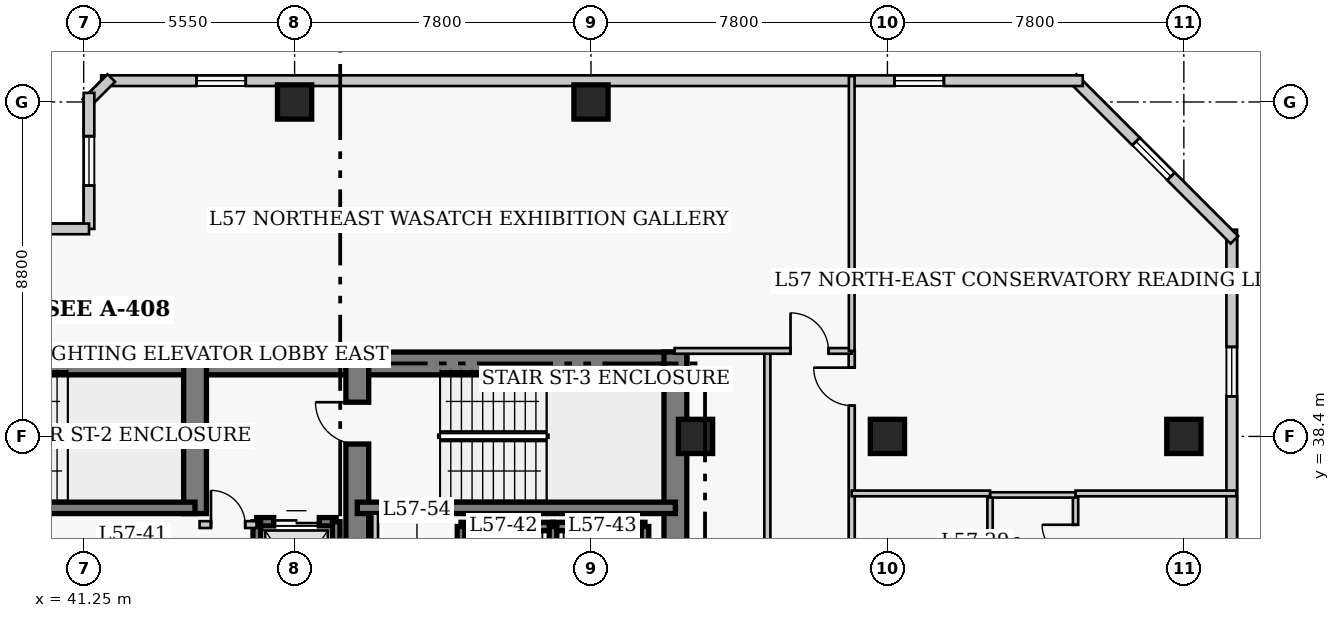
"""IFC4 building model, lengths in metres.
Left out: names, types, materials, properties, quantities, classifications, styles, units other than length and angle.
Written with IfcOpenShell. Run it as: python <this file> out.ifc"""

import sys

from ifc_helpers import new_model, si_unit, direction, frame, frame_2d, origin, origin_2d, place, context, subcontext, project, spatial, rectangle, extrude, element, fill, save


model = new_model("IFC4")
c1 = context("Model", 3, precision=1e-05, world=origin(), true_north=direction((0.0, 1.0)))
c2 = subcontext(c1, "Body", "Model", "MODEL_VIEW")
j1 = project(units=[si_unit("LENGTHUNIT", "METRE"), si_unit("PLANEANGLEUNIT", "RADIAN")], contexts=[c1])
p1 = place(None, origin())
s1 = spatial("IfcSite", under=j1, at=p1, CompositionType="ELEMENT")
p2 = place(p1, origin())
s2 = spatial("IfcBuilding", under=s1, at=p2, CompositionType="ELEMENT")
p3 = place(p2, frame((0.0, 0.0, 228.0)))
s3 = spatial("IfcBuildingStorey", under=s2, at=p3, CompositionType="ELEMENT", Elevation=228.0)
p4 = place(p3, frame((35.85, 40.32, 0.0), z_axis=(0.0, 0.0, 1.0), x_axis=(1.0, 0.0, 0.0)))
e1 = element("IfcWall", 1, at=p4, inside=s3, PredefinedType="SHEAR", context=c2, shape_type="SweptSolid", body=[
    extrude(rectangle(XDim=12.6, YDim=0.6, at=frame_2d((6.3, 0.0))), origin(), (0.0, 0.0, 1.0), 3.9),
])
p5 = place(p3, frame((48.45, 40.32, 0.0), z_axis=(0.0, 0.0, 1.0), x_axis=(1.0, 0.0, 0.0)))
e2 = element("IfcWall", 2, at=p5, inside=s3, PredefinedType="SHEAR", context=c2, shape_type="SweptSolid", body=[
    extrude(rectangle(XDim=8.67, YDim=0.6, at=frame_2d((4.335, 0.0))), origin(), (0.0, 0.0, 1.0), 3.9),
])
p6 = place(p3, frame((56.82, 27.05, 0.0), z_axis=(0.0, 0.0, 1.0), x_axis=(0.0, 1.0, 0.0)))
e3 = element("IfcWall", 3, at=p6, inside=s3, PredefinedType="SHEAR", context=c2, shape_type="SweptSolid", body=[
    extrude(rectangle(XDim=13.57, YDim=0.6, at=frame_2d((6.785, 0.0))), origin(), (0.0, 0.0, 1.0), 3.9),
])
p7 = place(p3, frame((44.18, 36.37, 0.0), z_axis=(0.0, 0.0, 1.0), x_axis=(0.0, 1.0, 0.0)))
e4 = element("IfcWall", 4, at=p7, inside=s3, PredefinedType="SHEAR", context=c2, shape_type="SweptSolid", body=[
    extrude(rectangle(XDim=3.95, YDim=0.6, at=frame_2d((1.975, 0.0))), origin(), (0.0, 0.0, 1.0), 3.9),
])
p8 = place(p3, frame((48.45, 32.45, 0.0), z_axis=(0.0, 0.0, 1.0), x_axis=(0.0, 1.0, 0.0)))
e5 = element("IfcWall", 5, at=p8, inside=s3, PredefinedType="SHEAR", context=c2, shape_type="SweptSolid", body=[
    extrude(rectangle(XDim=7.87, YDim=0.6, at=frame_2d((3.935, 0.0))), origin(), (0.0, 0.0, 1.0), 3.9),
])
p9 = place(p8, frame((5.75, 0.0, 0.0)))
e6 = element("IfcOpeningElement", 6, at=p9, cuts=e5, PredefinedType="OPENING", context=c2, shape_type="SweptSolid", body=[
    extrude(rectangle(XDim=1.1, YDim=2.15, at=frame_2d((0.55, 1.075))), frame((0.0, 0.31, 0.0), z_axis=(0.0, -1.0, 0.0), x_axis=(1.0, 0.0, 0.0)), (0.0, 0.0, 1.0), 0.62),
])
p10 = place(p3, frame((35.85, 36.52, 0.0), z_axis=(0.0, 0.0, 1.0), x_axis=(1.0, 0.0, 0.0)))
e7 = element("IfcWall", 7, at=p10, inside=s3, PredefinedType="SHEAR", context=c2, shape_type="SweptSolid", body=[
    extrude(rectangle(XDim=8.33, YDim=0.3, at=frame_2d((4.165, 0.0))), origin(), (0.0, 0.0, 1.0), 3.9),
])
p11 = place(p3, frame((48.45, 36.52, 0.0), z_axis=(0.0, 0.0, 1.0), x_axis=(1.0, 0.0, 0.0)))
e8 = element("IfcWall", 8, at=p11, inside=s3, PredefinedType="SHEAR", context=c2, shape_type="SweptSolid", body=[
    extrude(rectangle(XDim=8.37, YDim=0.3, at=frame_2d((4.185, 0.0))), origin(), (0.0, 0.0, 1.0), 3.9),
])
for number, where, z_axis, x_axis in (
    (9, (46.8, 47.2, 0.0), (0.0, 0.0, 1.0), (1.0, 0.0, 0.0)),
    (10, (54.6, 47.2, 0.0), (0.0, 0.0, 1.0), (1.0, 0.0, 0.0)),
    (11, (62.4, 38.4, 0.0), (0.0, 0.0, 1.0), (1.0, 0.0, 0.0)),
    (12, (70.2, 38.4, 0.0), (0.0, 0.0, 1.0), (1.0, 0.0, 0.0)),
    (13, (57.35, 38.4, 0.0), (0.0, 0.0, 1.0), (1.0, 0.0, 0.0)),
):
    element("IfcColumn", number, at=place(p3, frame(where, z_axis=z_axis, x_axis=x_axis)), inside=s3, PredefinedType="COLUMN", context=c2, shape_type="SweptSolid", body=[
        extrude(rectangle(XDim=0.9, YDim=0.9, at=origin_2d()), origin(), (0.0, 0.0, 1.0), 3.9),
    ])
p12 = place(p3, frame((71.46, 13.96, 0.0), z_axis=(0.0, 0.0, 1.0), x_axis=(0.0, 1.0, 0.0)))
e14 = element("IfcWall", 14, at=p12, inside=s3, PredefinedType="SOLIDWALL", context=c2, shape_type="SweptSolid", body=[
    extrude(rectangle(XDim=29.88, YDim=0.28, at=frame_2d((14.94, 0.0))), origin(), (0.0, 0.0, 1.0), 3.56),
])
p13 = place(p12, frame((3.085, 0.0, 0.85)))
e15 = element("IfcOpeningElement", 15, at=p13, cuts=e14, PredefinedType="OPENING", context=c2, shape_type="SweptSolid", body=[
    extrude(rectangle(XDim=1.3, YDim=1.7, at=frame_2d((0.65, 0.85))), frame((0.0, 0.15, 0.0), z_axis=(0.0, -1.0, 0.0), x_axis=(1.0, 0.0, 0.0)), (0.0, 0.0, 1.0), 0.3),
])
p14 = place(p12, frame((10.555, 0.0, 0.85)))
e16 = element("IfcOpeningElement", 16, at=p14, cuts=e14, PredefinedType="OPENING", context=c2, shape_type="SweptSolid", body=[
    extrude(rectangle(XDim=1.3, YDim=1.7, at=frame_2d((0.65, 0.85))), frame((0.0, 0.15, 0.0), z_axis=(0.0, -1.0, 0.0), x_axis=(1.0, 0.0, 0.0)), (0.0, 0.0, 1.0), 0.3),
])
p15 = place(p12, frame((18.025, 0.0, 0.85)))
e17 = element("IfcOpeningElement", 17, at=p15, cuts=e14, PredefinedType="OPENING", context=c2, shape_type="SweptSolid", body=[
    extrude(rectangle(XDim=1.3, YDim=1.7, at=frame_2d((0.65, 0.85))), frame((0.0, 0.15, 0.0), z_axis=(0.0, -1.0, 0.0), x_axis=(1.0, 0.0, 0.0)), (0.0, 0.0, 1.0), 0.3),
])
p16 = place(p12, frame((25.495, 0.0, 0.85)))
e18 = element("IfcOpeningElement", 18, at=p16, cuts=e14, PredefinedType="OPENING", context=c2, shape_type="SweptSolid", body=[
    extrude(rectangle(XDim=1.3, YDim=1.7, at=frame_2d((0.65, 0.85))), frame((0.0, 0.15, 0.0), z_axis=(0.0, -1.0, 0.0), x_axis=(1.0, 0.0, 0.0)), (0.0, 0.0, 1.0), 0.3),
])
p17 = place(p3, frame((71.529, 43.573, 0.0), z_axis=(0.0, 0.0, 1.0), x_axis=(-0.707106781187, 0.707106781187, 0.0)))
e19 = element("IfcWall", 19, at=p17, inside=s3, PredefinedType="SOLIDWALL", context=c2, shape_type="SweptSolid", body=[
    extrude(rectangle(XDim=6.02, YDim=0.28, at=frame_2d((3.01, 0.0))), origin(), (0.0, 0.0, 1.0), 3.56),
])
p18 = place(p17, frame((2.36, 0.0, 0.85)))
e20 = element("IfcOpeningElement", 20, at=p18, cuts=e19, PredefinedType="OPENING", context=c2, shape_type="SweptSolid", body=[
    extrude(rectangle(XDim=1.3, YDim=1.7, at=frame_2d((0.65, 0.85))), frame((0.0, 0.15, 0.0), z_axis=(0.0, -1.0, 0.0), x_axis=(1.0, 0.0, 0.0)), (0.0, 0.0, 1.0), 0.3),
])
p19 = place(p3, frame((67.54, 47.76, 0.0), z_axis=(0.0, 0.0, 1.0), x_axis=(-1.0, 0.0, 0.0)))
e21 = element("IfcWall", 21, at=p19, inside=s3, PredefinedType="SOLIDWALL", context=c2, shape_type="SweptSolid", body=[
    extrude(rectangle(XDim=25.83, YDim=0.28, at=frame_2d((12.915, 0.0))), origin(), (0.0, 0.0, 1.0), 3.56),
])
p20 = place(p19, frame((3.655, 0.0, 0.85)))
e22 = element("IfcOpeningElement", 22, at=p20, cuts=e21, PredefinedType="OPENING", context=c2, shape_type="SweptSolid", body=[
    extrude(rectangle(XDim=1.3, YDim=1.7, at=frame_2d((0.65, 0.85))), frame((0.0, 0.15, 0.0), z_axis=(0.0, -1.0, 0.0), x_axis=(1.0, 0.0, 0.0)), (0.0, 0.0, 1.0), 0.3),
])
p21 = place(p19, frame((22.025, 0.0, 0.85)))
e23 = element("IfcOpeningElement", 23, at=p21, cuts=e21, PredefinedType="OPENING", context=c2, shape_type="SweptSolid", body=[
    extrude(rectangle(XDim=1.3, YDim=1.7, at=frame_2d((0.65, 0.85))), frame((0.0, 0.15, 0.0), z_axis=(0.0, -1.0, 0.0), x_axis=(1.0, 0.0, 0.0)), (0.0, 0.0, 1.0), 0.3),
])
p22 = place(p3, frame((41.977, 47.829, 0.0), z_axis=(0.0, 0.0, 1.0), x_axis=(-0.706975312048, -0.707238225886, 0.0)))
e24 = element("IfcWall", 24, at=p22, inside=s3, PredefinedType="SOLIDWALL", context=c2, shape_type="SweptSolid", body=[
    extrude(rectangle(XDim=0.929, YDim=0.28, at=frame_2d((0.464, 0.0))), origin(), (0.0, 0.0, 1.0), 3.56),
])
p23 = place(p3, frame((41.39, 47.44, 0.0), z_axis=(0.0, 0.0, 1.0), x_axis=(0.0, -1.0, 0.0)))
e25 = element("IfcWall", 25, at=p23, inside=s3, PredefinedType="SOLIDWALL", context=c2, shape_type="SweptSolid", body=[
    extrude(rectangle(XDim=3.58, YDim=0.28, at=frame_2d((1.79, 0.0))), origin(), (0.0, 0.0, 1.0), 3.56),
])
p24 = place(p23, frame((1.14, 0.0, 0.85)))
e26 = element("IfcOpeningElement", 26, at=p24, cuts=e25, PredefinedType="OPENING", context=c2, shape_type="SweptSolid", body=[
    extrude(rectangle(XDim=1.3, YDim=1.7, at=frame_2d((0.65, 0.85))), frame((0.0, 0.15, 0.0), z_axis=(0.0, -1.0, 0.0), x_axis=(1.0, 0.0, 0.0)), (0.0, 0.0, 1.0), 0.3),
])
p25 = place(p3, frame((41.39, 43.86, 0.0), z_axis=(0.0, 0.0, 1.0), x_axis=(-1.0, 0.0, 0.0)))
e27 = element("IfcWall", 27, at=p25, inside=s3, PredefinedType="SOLIDWALL", context=c2, shape_type="SweptSolid", body=[
    extrude(rectangle(XDim=4.78, YDim=0.28, at=frame_2d((2.39, 0.0))), origin(), (0.0, 0.0, 1.0), 3.56),
])
p26 = place(p25, frame((1.74, 0.0, 0.85)))
e28 = element("IfcOpeningElement", 28, at=p26, cuts=e27, PredefinedType="OPENING", context=c2, shape_type="SweptSolid", body=[
    extrude(rectangle(XDim=1.3, YDim=1.7, at=frame_2d((0.65, 0.85))), frame((0.0, 0.15, 0.0), z_axis=(0.0, -1.0, 0.0), x_axis=(1.0, 0.0, 0.0)), (0.0, 0.0, 1.0), 0.3),
])
p27 = place(p3, frame((51.18, 36.03, 0.0), z_axis=(0.0, 0.0, 1.0), x_axis=(1.0, 0.0, 0.0)))
e29 = element("IfcWall", 29, at=p27, inside=s3, PredefinedType="SHEAR", context=c2, shape_type="SweptSolid", body=[
    extrude(rectangle(XDim=2.42, YDim=0.22, at=frame_2d((1.21, 0.0))), origin(), (0.0, 0.0, 1.0), 3.9),
])
p28 = place(p3, frame((51.18, 33.17, 0.0), z_axis=(0.0, 0.0, 1.0), x_axis=(0.0, 1.0, 0.0)))
e30 = element("IfcWall", 30, at=p28, inside=s3, PredefinedType="SHEAR", context=c2, shape_type="SweptSolid", body=[
    extrude(rectangle(XDim=2.86, YDim=0.2, at=frame_2d((1.43, 0.0))), origin(), (0.0, 0.0, 1.0), 3.9),
])
p29 = place(p3, frame((53.6, 36.03, 0.0), z_axis=(0.0, 0.0, 1.0), x_axis=(1.0, 0.0, 0.0)))
e31 = element("IfcWall", 31, at=p29, inside=s3, PredefinedType="SHEAR", context=c2, shape_type="SweptSolid", body=[
    extrude(rectangle(XDim=2.42, YDim=0.22, at=frame_2d((1.21, 0.0))), origin(), (0.0, 0.0, 1.0), 3.9),
])
for number, where, z_axis, x_axis in (
    (32, (53.6, 33.17, 0.0), (0.0, 0.0, 1.0), (0.0, 1.0, 0.0)),
    (33, (56.02, 33.17, 0.0), (0.0, 0.0, 1.0), (0.0, 1.0, 0.0)),
):
    element("IfcWall", number, at=place(p3, frame(where, z_axis=z_axis, x_axis=x_axis)), inside=s3, PredefinedType="SHEAR", context=c2, shape_type="SweptSolid", body=[
        extrude(rectangle(XDim=2.86, YDim=0.2, at=frame_2d((1.43, 0.0))), origin(), (0.0, 0.0, 1.0), 3.9),
    ])
p30 = place(p3, frame((45.805, 36.155, 0.0), z_axis=(0.0, 0.0, 1.0), x_axis=(1.0, 0.0, 0.0)))
e34 = element("IfcWall", 34, at=p30, inside=s3, PredefinedType="SHEAR", context=c2, shape_type="SweptSolid", body=[
    extrude(rectangle(XDim=2.09, YDim=0.22, at=frame_2d((1.045, 0.0))), origin(), (0.0, 0.0, 1.0), 3.9),
])
p31 = place(p30, frame((0.445, 0.0, 0.0)))
e35 = element("IfcOpeningElement", 35, at=p31, cuts=e34, PredefinedType="OPENING", context=c2, shape_type="SweptSolid", body=[
    extrude(rectangle(XDim=1.2, YDim=2.15, at=frame_2d((0.6, 1.075))), frame((0.0, 0.12, 0.0), z_axis=(0.0, -1.0, 0.0), x_axis=(1.0, 0.0, 0.0)), (0.0, 0.0, 1.0), 0.24),
])
p32 = place(p3, frame((45.805, 32.65, 0.0), z_axis=(0.0, 0.0, 1.0), x_axis=(0.0, 1.0, 0.0)))
e36 = element("IfcWall", 36, at=p32, inside=s3, PredefinedType="SHEAR", context=c2, shape_type="SweptSolid", body=[
    extrude(rectangle(XDim=3.505, YDim=0.2, at=frame_2d((1.752, 0.0))), origin(), (0.0, 0.0, 1.0), 3.9),
])
p33 = place(p3, frame((47.895, 33.245, 0.0), z_axis=(0.0, 0.0, 1.0), x_axis=(0.0, 1.0, 0.0)))
e37 = element("IfcWall", 37, at=p33, inside=s3, PredefinedType="SHEAR", context=c2, shape_type="SweptSolid", body=[
    extrude(rectangle(XDim=2.91, YDim=0.2, at=frame_2d((1.455, 0.0))), origin(), (0.0, 0.0, 1.0), 3.9),
])
p34 = place(p3, frame((44.3, 36.08, 0.0), z_axis=(0.0, 0.0, 1.0), x_axis=(1.0, 0.0, 0.0)))
e38 = element("IfcWall", 38, at=p34, inside=s3, PredefinedType="PARTITIONING", context=c2, shape_type="SweptSolid", body=[
    extrude(rectangle(XDim=1.5, YDim=0.18, at=frame_2d((0.75, 0.0))), origin(), (0.0, 0.0, 1.0), 3.56),
])
p35 = place(p34, frame((0.3, 0.0, 0.0)))
e39 = element("IfcOpeningElement", 39, at=p35, cuts=e38, PredefinedType="OPENING", context=c2, shape_type="SweptSolid", body=[
    extrude(rectangle(XDim=0.9, YDim=2.15, at=frame_2d((0.45, 1.075))), frame((0.0, 0.1, 0.0), z_axis=(0.0, -1.0, 0.0), x_axis=(1.0, 0.0, 0.0)), (0.0, 0.0, 1.0), 0.2),
])
p36 = place(p3, frame((48.92, 32.75, 0.0), z_axis=(0.0, 0.0, 1.0), x_axis=(0.0, 1.0, 0.0)))
e40 = element("IfcWall", 40, at=p36, inside=s3, PredefinedType="PARTITIONING", context=c2, shape_type="SweptSolid", body=[
    extrude(rectangle(XDim=3.62, YDim=0.15, at=frame_2d((1.81, 0.0))), origin(), (0.0, 0.0, 1.0), 3.56),
])
p37 = place(p3, frame((61.46, 11.95, 0.0), z_axis=(0.0, 0.0, 1.0), x_axis=(0.0, 1.0, 0.0)))
e41 = element("IfcWall", 41, at=p37, inside=s3, PredefinedType="PARTITIONING", context=c2, shape_type="SweptSolid", body=[
    extrude(rectangle(XDim=28.7, YDim=0.16, at=frame_2d((14.35, 0.0))), origin(), (0.0, 0.0, 1.0), 3.56),
])
p38 = place(p37, frame((3.55, 0.0, 0.0)))
e42 = element("IfcOpeningElement", 42, at=p38, cuts=e41, PredefinedType="OPENING", context=c2, shape_type="SweptSolid", body=[
    extrude(rectangle(XDim=0.95, YDim=2.1, at=frame_2d((0.475, 1.05))), frame((0.0, 0.09, 0.0), z_axis=(0.0, -1.0, 0.0), x_axis=(1.0, 0.0, 0.0)), (0.0, 0.0, 1.0), 0.18),
])
p39 = place(p37, frame((9.919, 0.0, 0.0)))
e43 = element("IfcOpeningElement", 43, at=p39, cuts=e41, PredefinedType="OPENING", context=c2, shape_type="SweptSolid", body=[
    extrude(rectangle(XDim=0.95, YDim=2.1, at=frame_2d((0.475, 1.05))), frame((0.0, 0.09, 0.0), z_axis=(0.0, -1.0, 0.0), x_axis=(1.0, 0.0, 0.0)), (0.0, 0.0, 1.0), 0.18),
])
p40 = place(p37, frame((27.26, 0.0, 0.0)))
e44 = element("IfcOpeningElement", 44, at=p40, cuts=e41, PredefinedType="OPENING", context=c2, shape_type="SweptSolid", body=[
    extrude(rectangle(XDim=1.0, YDim=2.15, at=frame_2d((0.5, 1.075))), frame((0.0, 0.09, 0.0), z_axis=(0.0, -1.0, 0.0), x_axis=(1.0, 0.0, 0.0)), (0.0, 0.0, 1.0), 0.18),
])
p41 = place(p3, frame((59.24, 17.66, 0.0), z_axis=(0.0, 0.0, 1.0), x_axis=(0.0, 1.0, 0.0)))
e45 = element("IfcWall", 45, at=p41, inside=s3, PredefinedType="PARTITIONING", context=c2, shape_type="SweptSolid", body=[
    extrude(rectangle(XDim=22.99, YDim=0.16, at=frame_2d((11.495, 0.0))), origin(), (0.0, 0.0, 1.0), 3.56),
])
p42 = place(p3, frame((56.8, 40.65, 0.0), z_axis=(0.0, 0.0, 1.0), x_axis=(1.0, 0.0, 0.0)))
e46 = element("IfcWall", 46, at=p42, inside=s3, PredefinedType="PARTITIONING", context=c2, shape_type="SweptSolid", body=[
    extrude(rectangle(XDim=4.66, YDim=0.15, at=frame_2d((2.33, 0.0))), origin(), (0.0, 0.0, 1.0), 3.56),
])
p43 = place(p42, frame((3.05, 0.0, 0.0)))
e47 = element("IfcOpeningElement", 47, at=p43, cuts=e46, PredefinedType="OPENING", context=c2, shape_type="SweptSolid", body=[
    extrude(rectangle(XDim=1.0, YDim=2.15, at=frame_2d((0.5, 1.075))), frame((0.0, 0.085, 0.0), z_axis=(0.0, -1.0, 0.0), x_axis=(1.0, 0.0, 0.0)), (0.0, 0.0, 1.0), 0.17),
])
p44 = place(p3, frame((61.46, 40.65, 0.0), z_axis=(0.0, 0.0, 1.0), x_axis=(0.0, 1.0, 0.0)))
e48 = element("IfcWall", 48, at=p44, inside=s3, PredefinedType="PARTITIONING", context=c2, shape_type="SweptSolid", body=[
    extrude(rectangle(XDim=7.23, YDim=0.15, at=frame_2d((3.615, 0.0))), origin(), (0.0, 0.0, 1.0), 3.56),
])
p45 = place(p3, frame((65.1, 34.41, 0.0), z_axis=(0.0, 0.0, 1.0), x_axis=(0.0, 1.0, 0.0)))
e49 = element("IfcWall", 49, at=p45, inside=s3, PredefinedType="PLUMBINGWALL", context=c2, shape_type="SweptSolid", body=[
    extrude(rectangle(XDim=2.45, YDim=0.14, at=frame_2d((1.225, 0.0))), origin(), (0.0, 0.0, 1.0), 3.56),
])
p46 = place(p3, frame((67.35, 34.41, 0.0), z_axis=(0.0, 0.0, 1.0), x_axis=(0.0, 1.0, 0.0)))
e50 = element("IfcWall", 50, at=p46, inside=s3, PredefinedType="PLUMBINGWALL", context=c2, shape_type="SweptSolid", body=[
    extrude(rectangle(XDim=2.45, YDim=0.14, at=frame_2d((1.225, 0.0))), origin(), (0.0, 0.0, 1.0), 3.56),
])
p47 = place(p46, frame((0.785, 0.0, 0.0)))
e51 = element("IfcOpeningElement", 51, at=p47, cuts=e50, PredefinedType="OPENING", context=c2, shape_type="SweptSolid", body=[
    extrude(rectangle(XDim=0.88, YDim=2.05, at=frame_2d((0.44, 1.025))), frame((0.0, 0.08, 0.0), z_axis=(0.0, -1.0, 0.0), x_axis=(1.0, 0.0, 0.0)), (0.0, 0.0, 1.0), 0.16),
])
p48 = place(p3, frame((65.1, 36.86, 0.0), z_axis=(0.0, 0.0, 1.0), x_axis=(1.0, 0.0, 0.0)))
e52 = element("IfcWall", 52, at=p48, inside=s3, PredefinedType="PLUMBINGWALL", context=c2, shape_type="SweptSolid", body=[
    extrude(rectangle(XDim=2.25, YDim=0.14, at=frame_2d((1.125, 0.0))), origin(), (0.0, 0.0, 1.0), 3.56),
])
p49 = place(p3, frame((61.46, 36.9, 0.0), z_axis=(0.0, 0.0, 1.0), x_axis=(1.0, 0.0, 0.0)))
e53 = element("IfcWall", 53, at=p49, inside=s3, PredefinedType="PARTITIONING", context=c2, shape_type="SweptSolid", body=[
    extrude(rectangle(XDim=3.64, YDim=0.15, at=frame_2d((1.82, 0.0))), origin(), (0.0, 0.0, 1.0), 3.56),
])
p50 = place(p3, frame((67.35, 36.9, 0.0), z_axis=(0.0, 0.0, 1.0), x_axis=(1.0, 0.0, 0.0)))
e54 = element("IfcWall", 54, at=p50, inside=s3, PredefinedType="PARTITIONING", context=c2, shape_type="SweptSolid", body=[
    extrude(rectangle(XDim=4.23, YDim=0.15, at=frame_2d((2.115, 0.0))), origin(), (0.0, 0.0, 1.0), 3.56),
])
p51 = place(p16, origin())
e55 = element("IfcWindow", 55, at=p51, inside=s3, PartitioningType="SINGLE_PANEL", PredefinedType="WINDOW", context=c2, shape_type="SweptSolid", body=[
    extrude(rectangle(XDim=1.3, YDim=1.7, at=frame_2d((0.65, 0.85))), frame((0.0, 0.03, 0.0), z_axis=(0.0, -1.0, 0.0), x_axis=(1.0, 0.0, 0.0)), (0.0, 0.0, 1.0), 0.06),
])
fill(e18, e55)
p52 = place(p18, origin())
e56 = element("IfcWindow", 56, at=p52, inside=s3, PartitioningType="SINGLE_PANEL", PredefinedType="WINDOW", context=c2, shape_type="SweptSolid", body=[
    extrude(rectangle(XDim=1.3, YDim=1.7, at=frame_2d((0.65, 0.85))), frame((0.0, 0.03, 0.0), z_axis=(0.0, -1.0, 0.0), x_axis=(1.0, 0.0, 0.0)), (0.0, 0.0, 1.0), 0.06),
])
fill(e20, e56)
p53 = place(p20, origin())
e57 = element("IfcWindow", 57, at=p53, inside=s3, PartitioningType="SINGLE_PANEL", PredefinedType="WINDOW", context=c2, shape_type="SweptSolid", body=[
    extrude(rectangle(XDim=1.3, YDim=1.7, at=frame_2d((0.65, 0.85))), frame((0.0, 0.03, 0.0), z_axis=(0.0, -1.0, 0.0), x_axis=(1.0, 0.0, 0.0)), (0.0, 0.0, 1.0), 0.06),
])
fill(e22, e57)
p54 = place(p21, origin())
e58 = element("IfcWindow", 58, at=p54, inside=s3, PartitioningType="SINGLE_PANEL", PredefinedType="WINDOW", context=c2, shape_type="SweptSolid", body=[
    extrude(rectangle(XDim=1.3, YDim=1.7, at=frame_2d((0.65, 0.85))), frame((0.0, 0.03, 0.0), z_axis=(0.0, -1.0, 0.0), x_axis=(1.0, 0.0, 0.0)), (0.0, 0.0, 1.0), 0.06),
])
fill(e23, e58)
p55 = place(p24, origin())
e59 = element("IfcWindow", 59, at=p55, inside=s3, PartitioningType="SINGLE_PANEL", PredefinedType="WINDOW", context=c2, shape_type="SweptSolid", body=[
    extrude(rectangle(XDim=1.3, YDim=1.7, at=frame_2d((0.65, 0.85))), frame((0.0, 0.03, 0.0), z_axis=(0.0, -1.0, 0.0), x_axis=(1.0, 0.0, 0.0)), (0.0, 0.0, 1.0), 0.06),
])
fill(e26, e59)
p56 = place(p31, origin())
e60 = element("IfcDoor", 60, at=p56, inside=s3, OperationType="DOUBLE_DOOR_SLIDING", PredefinedType="DOOR", context=c2, shape_type="SweptSolid", body=[
    extrude(rectangle(XDim=1.2, YDim=2.15, at=frame_2d((0.6, 1.075))), frame((0.0, 0.025, 0.0), z_axis=(0.0, -1.0, 0.0), x_axis=(1.0, 0.0, 0.0)), (0.0, 0.0, 1.0), 0.05),
])
fill(e35, e60)
p57 = place(p35, origin())
e61 = element("IfcDoor", 61, at=p57, inside=s3, OperationType="SINGLE_SWING_LEFT", PredefinedType="DOOR", context=c2, shape_type="SweptSolid", body=[
    extrude(rectangle(XDim=0.9, YDim=2.15, at=frame_2d((0.45, 1.075))), frame((0.0, 0.025, 0.0), z_axis=(0.0, -1.0, 0.0), x_axis=(1.0, 0.0, 0.0)), (0.0, 0.0, 1.0), 0.05),
])
fill(e39, e61)
p58 = place(p43, origin())
e62 = element("IfcDoor", 62, at=p58, inside=s3, OperationType="SINGLE_SWING_LEFT", PredefinedType="DOOR", context=c2, shape_type="SweptSolid", body=[
    extrude(rectangle(XDim=1.0, YDim=2.15, at=frame_2d((0.5, 1.075))), frame((0.0, 0.025, 0.0), z_axis=(0.0, -1.0, 0.0), x_axis=(1.0, 0.0, 0.0)), (0.0, 0.0, 1.0), 0.05),
])
fill(e47, e62)
p59 = place(p47, origin())
e63 = element("IfcDoor", 63, at=p59, inside=s3, OperationType="SINGLE_SWING_RIGHT", PredefinedType="DOOR", context=c2, shape_type="SweptSolid", body=[
    extrude(rectangle(XDim=0.88, YDim=2.05, at=frame_2d((0.44, 1.025))), frame((0.0, 0.025, 0.0), z_axis=(0.0, -1.0, 0.0), x_axis=(1.0, 0.0, 0.0)), (0.0, 0.0, 1.0), 0.05),
])
fill(e51, e63)
p60 = place(p40, origin())
e64 = element("IfcDoor", 64, at=p60, inside=s3, OperationType="SINGLE_SWING_RIGHT", PredefinedType="DOOR", context=c2, shape_type="SweptSolid", body=[
    extrude(rectangle(XDim=1.0, YDim=2.15, at=frame_2d((0.5, 1.075))), frame((0.0, 0.025, 0.0), z_axis=(0.0, -1.0, 0.0), x_axis=(1.0, 0.0, 0.0)), (0.0, 0.0, 1.0), 0.05),
])
fill(e44, e64)
p61 = place(p9, origin())
e65 = element("IfcDoor", 65, at=p61, inside=s3, OperationType="SINGLE_SWING_RIGHT", PredefinedType="DOOR", context=c2, shape_type="SweptSolid", body=[
    extrude(rectangle(XDim=1.1, YDim=2.15, at=frame_2d((0.55, 1.075))), frame((0.0, 0.025, 0.0), z_axis=(0.0, -1.0, 0.0), x_axis=(1.0, 0.0, 0.0)), (0.0, 0.0, 1.0), 0.05),
])
fill(e6, e65)
save(model, sys.argv[1])
